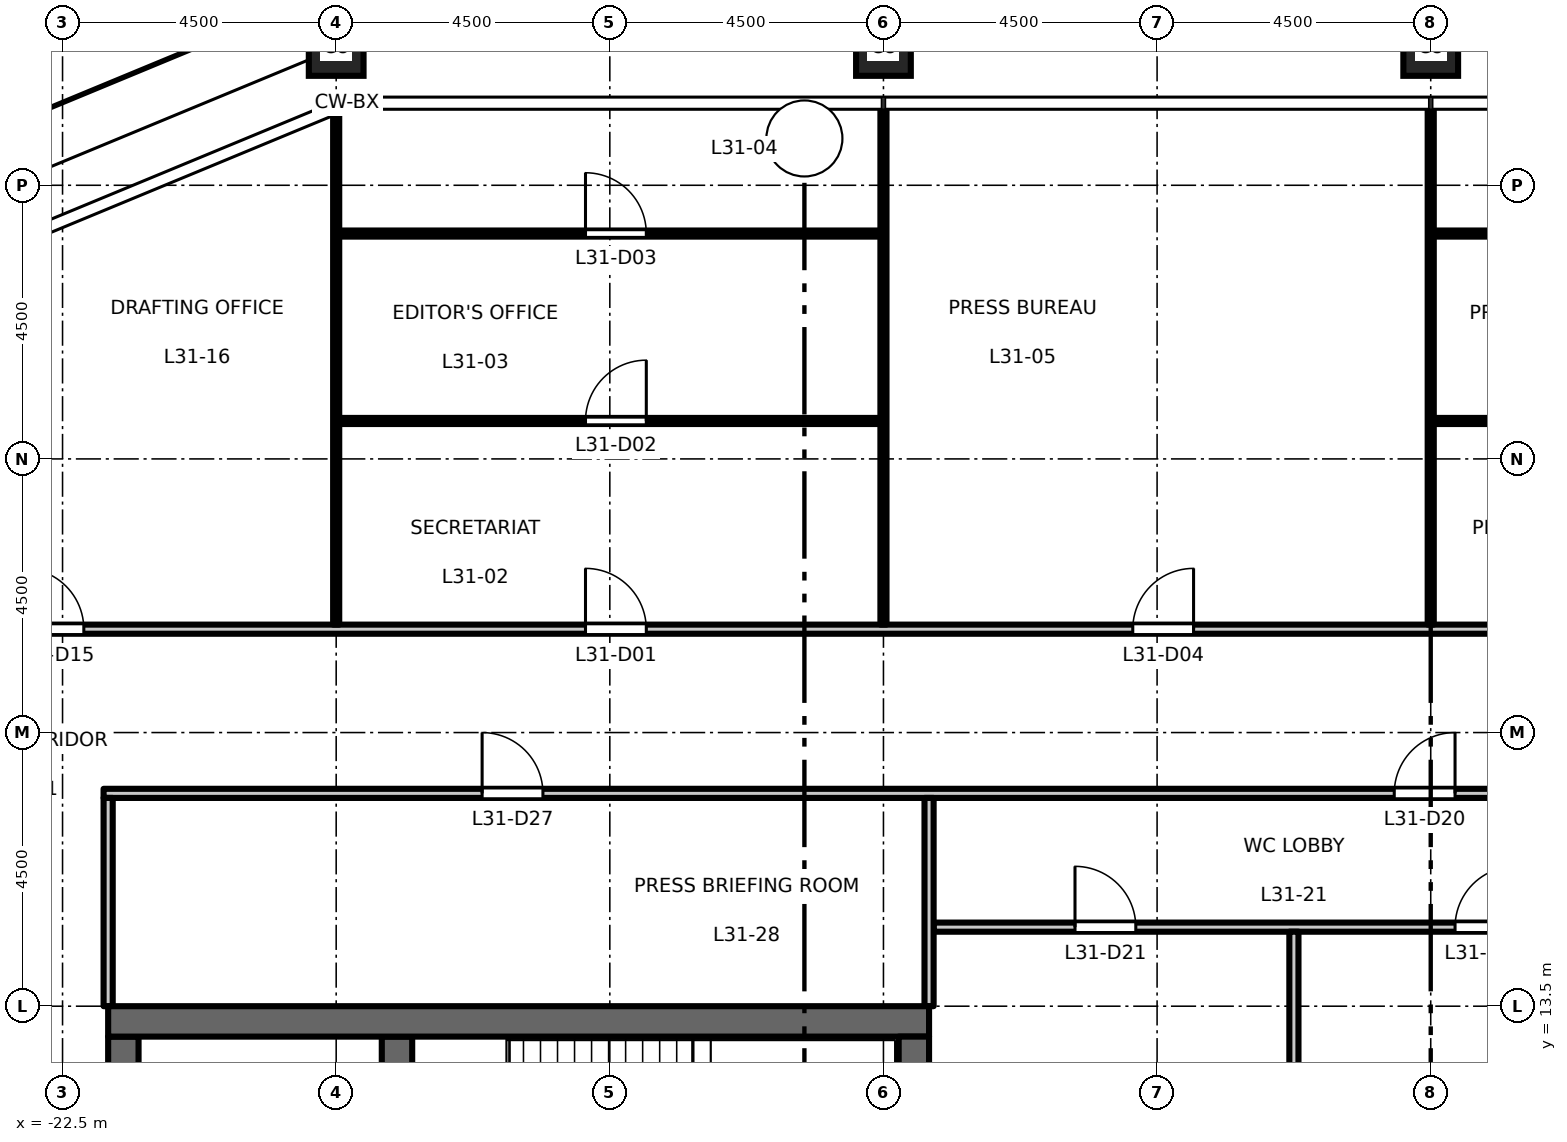
"""IFC4 building model, lengths in metres.
Left out: names, types, materials, properties, quantities, classifications, styles, units other than length and angle.
Written with IfcOpenShell. Run it as: python <this file> out.ifc"""

import sys

from ifc_helpers import new_model, si_unit, direction, frame, frame_2d, origin, origin_2d, place, context, subcontext, project, spatial, rectangle, hollow_rectangle, extrude, element, fill, save


model = new_model("IFC4")
c1 = context("Model", 3, precision=1e-05, world=origin(), true_north=direction((0.0, 1.0)))
c2 = subcontext(c1, "Body", "Model", "MODEL_VIEW")
j1 = project(units=[si_unit("LENGTHUNIT", "METRE"), si_unit("PLANEANGLEUNIT", "RADIAN")], contexts=[c1])
p1 = place(None, origin())
s1 = spatial("IfcSite", under=j1, at=p1, CompositionType="ELEMENT")
p2 = place(p1, origin())
s2 = spatial("IfcBuilding", under=s1, at=p2, CompositionType="ELEMENT")
p3 = place(p2, frame((0.0, 0.0, 145.2)))
s3 = spatial("IfcBuildingStorey", under=s2, at=p3, CompositionType="ELEMENT", Elevation=145.2)
for number, where, z_axis, x_axis in (
    (1, (0.0, 29.25, 0.0), (0.0, 0.0, 1.0), (1.0, 0.0, 0.0)),
    (2, (-9.0, 29.25, 0.0), (0.0, 0.0, 1.0), (1.0, 0.0, 0.0)),
    (3, (-18.0, 29.25, 0.0), (0.0, 0.0, 1.0), (1.0, 0.0, 0.0)),
):
    element("IfcColumn", number, at=place(p3, frame(where, z_axis=z_axis, x_axis=x_axis)), inside=s3, PredefinedType="COLUMN", context=c2, shape_type="SweptSolid", body=[
        extrude(hollow_rectangle(XDim=0.9, YDim=0.9, WallThickness=0.05, at=origin_2d()), origin(), (0.0, 0.0, 1.0), 4.5),
    ])
p4 = place(p3, frame((-21.5, -13.0, 0.0), z_axis=(0.0, 0.0, 1.0), x_axis=(0.0, 1.0, 0.0)))
e4 = element("IfcWall", 4, at=p4, inside=s3, PredefinedType="SHEAR", context=c2, shape_type="SweptSolid", body=[
    extrude(rectangle(XDim=26.0, YDim=0.5, at=frame_2d((13.0, 0.0))), origin(), (0.0, 0.0, 1.0), 4.35),
])
p5 = place(p4, frame((16.825, 0.0, 0.0)))
e5 = element("IfcOpeningElement", 5, at=p5, cuts=e4, PredefinedType="OPENING", context=c2, shape_type="SweptSolid", body=[
    extrude(rectangle(XDim=1.8, YDim=2.1, at=frame_2d((0.9, 1.05))), frame((0.0, 0.26, 0.0), z_axis=(0.0, -1.0, 0.0), x_axis=(1.0, 0.0, 0.0)), (0.0, 0.0, 1.0), 0.52),
])
p6 = place(p4, frame((7.375, 0.0, 0.0)))
e6 = element("IfcOpeningElement", 6, at=p6, cuts=e4, PredefinedType="OPENING", context=c2, shape_type="SweptSolid", body=[
    extrude(rectangle(XDim=1.8, YDim=2.1, at=frame_2d((0.9, 1.05))), frame((0.0, 0.26, 0.0), z_axis=(0.0, -1.0, 0.0), x_axis=(1.0, 0.0, 0.0)), (0.0, 0.0, 1.0), 0.52),
])
p7 = place(p4, frame((23.4, 0.0, 0.0)))
e7 = element("IfcOpeningElement", 7, at=p7, cuts=e4, PredefinedType="OPENING", context=c2, shape_type="SweptSolid", body=[
    extrude(rectangle(XDim=0.9, YDim=2.1, at=frame_2d((0.45, 1.05))), frame((0.0, 0.26, 0.0), z_axis=(0.0, -1.0, 0.0), x_axis=(1.0, 0.0, 0.0)), (0.0, 0.0, 1.0), 0.52),
])
p8 = place(p3, frame((-17.0, 6.425, 0.0), z_axis=(0.0, 0.0, 1.0), x_axis=(0.0, 1.0, 0.0)))
e8 = element("IfcWall", 8, at=p8, inside=s3, PredefinedType="SHEAR", context=c2, shape_type="SweptSolid", body=[
    extrude(rectangle(XDim=6.575, YDim=0.5, at=frame_2d((3.288, 0.0))), origin(), (0.0, 0.0, 1.0), 4.35),
])
p9 = place(p3, frame((-8.25, 13.25, 0.0), z_axis=(0.0, 0.0, 1.0), x_axis=(-1.0, 0.0, 0.0)))
e9 = element("IfcWall", 9, at=p9, inside=s3, PredefinedType="SHEAR", context=c2, shape_type="SweptSolid", body=[
    extrude(rectangle(XDim=13.5, YDim=0.5, at=frame_2d((6.75, 0.0))), origin(), (0.0, 0.0, 1.0), 4.35),
])
p10 = place(p3, frame((-8.5, -13.0, 0.0), z_axis=(0.0, 0.0, 1.0), x_axis=(0.0, 1.0, 0.0)))
e10 = element("IfcWall", 10, at=p10, inside=s3, PredefinedType="SHEAR", context=c2, shape_type="SweptSolid", body=[
    extrude(rectangle(XDim=26.0, YDim=0.5, at=frame_2d((13.0, 0.0))), origin(), (0.0, 0.0, 1.0), 4.35),
])
p11 = place(p3, frame((-8.175, 14.8, 0.0), z_axis=(0.0, 0.0, 1.0), x_axis=(1.0, 0.0, 0.0)))
e11 = element("IfcWall", 11, at=p11, inside=s3, PredefinedType="PARTITIONING", context=c2, shape_type="SweptSolid", body=[
    extrude(rectangle(XDim=14.955, YDim=0.15, at=frame_2d((7.478, 0.0))), origin(), (0.0, 0.0, 1.0), 4.35),
])
p12 = place(p11, frame((2.325, 0.0, 0.0)))
e12 = element("IfcOpeningElement", 12, at=p12, cuts=e11, PredefinedType="OPENING", context=c2, shape_type="SweptSolid", body=[
    extrude(rectangle(XDim=1.0, YDim=2.1, at=frame_2d((0.5, 1.05))), frame((0.0, 0.085, 0.0), z_axis=(0.0, -1.0, 0.0), x_axis=(1.0, 0.0, 0.0)), (0.0, 0.0, 1.0), 0.17),
])
p13 = place(p11, frame((8.575, 0.0, 0.0)))
e13 = element("IfcOpeningElement", 13, at=p13, cuts=e11, PredefinedType="OPENING", context=c2, shape_type="SweptSolid", body=[
    extrude(rectangle(XDim=1.0, YDim=2.1, at=frame_2d((0.5, 1.05))), frame((0.0, 0.085, 0.0), z_axis=(0.0, -1.0, 0.0), x_axis=(1.0, 0.0, 0.0)), (0.0, 0.0, 1.0), 0.17),
])
p14 = place(p11, frame((12.825, 0.0, 0.0)))
e14 = element("IfcOpeningElement", 14, at=p14, cuts=e11, PredefinedType="OPENING", context=c2, shape_type="SweptSolid", body=[
    extrude(rectangle(XDim=1.0, YDim=2.1, at=frame_2d((0.5, 1.05))), frame((0.0, 0.085, 0.0), z_axis=(0.0, -1.0, 0.0), x_axis=(1.0, 0.0, 0.0)), (0.0, 0.0, 1.0), 0.17),
])
p15 = place(p3, frame((-21.825, 17.0, 0.0), z_axis=(0.0, 0.0, 1.0), x_axis=(1.0, 0.0, 0.0)))
e15 = element("IfcWall", 15, at=p15, inside=s3, PredefinedType="PARTITIONING", context=c2, shape_type="SweptSolid", body=[
    extrude(rectangle(XDim=43.65, YDim=0.15, at=frame_2d((21.825, 0.0))), origin(), (0.0, 0.0, 1.0), 4.35),
])
p16 = place(p15, frame((21.225, 0.0, 0.0)))
e16 = element("IfcOpeningElement", 16, at=p16, cuts=e15, PredefinedType="OPENING", context=c2, shape_type="SweptSolid", body=[
    extrude(rectangle(XDim=1.0, YDim=2.1, at=frame_2d((0.5, 1.05))), frame((0.0, 0.085, 0.0), z_axis=(0.0, -1.0, 0.0), x_axis=(1.0, 0.0, 0.0)), (0.0, 0.0, 1.0), 0.17),
])
p17 = place(p15, frame((6.225, 0.0, 0.0)))
e17 = element("IfcOpeningElement", 17, at=p17, cuts=e15, PredefinedType="OPENING", context=c2, shape_type="SweptSolid", body=[
    extrude(rectangle(XDim=1.0, YDim=2.1, at=frame_2d((0.5, 1.05))), frame((0.0, 0.085, 0.0), z_axis=(0.0, -1.0, 0.0), x_axis=(1.0, 0.0, 0.0)), (0.0, 0.0, 1.0), 0.17),
])
p18 = place(p15, frame((36.225, 0.0, 0.0)))
e18 = element("IfcOpeningElement", 18, at=p18, cuts=e15, PredefinedType="OPENING", context=c2, shape_type="SweptSolid", body=[
    extrude(rectangle(XDim=1.0, YDim=2.1, at=frame_2d((0.5, 1.05))), frame((0.0, 0.085, 0.0), z_axis=(0.0, -1.0, 0.0), x_axis=(1.0, 0.0, 0.0)), (0.0, 0.0, 1.0), 0.17),
])
p19 = place(p3, frame((-27.474, 19.7, 0.0), z_axis=(0.0, 0.0, 1.0), x_axis=(1.0, 0.0, 0.0)))
e19 = element("IfcWall", 19, at=p19, inside=s3, PredefinedType="PARTITIONING", context=c2, shape_type="SweptSolid", body=[
    extrude(rectangle(XDim=54.948, YDim=0.15, at=frame_2d((27.474, 0.0))), origin(), (0.0, 0.0, 1.0), 4.35),
])
p20 = place(p19, frame((13.574, 0.0, 0.0)))
e20 = element("IfcOpeningElement", 20, at=p20, cuts=e19, PredefinedType="OPENING", context=c2, shape_type="SweptSolid", body=[
    extrude(rectangle(XDim=1.0, YDim=2.1, at=frame_2d((0.5, 1.05))), frame((0.0, 0.085, 0.0), z_axis=(0.0, -1.0, 0.0), x_axis=(1.0, 0.0, 0.0)), (0.0, 0.0, 1.0), 0.17),
])
p21 = place(p19, frame((22.574, 0.0, 0.0)))
e21 = element("IfcOpeningElement", 21, at=p21, cuts=e19, PredefinedType="OPENING", context=c2, shape_type="SweptSolid", body=[
    extrude(rectangle(XDim=1.0, YDim=2.1, at=frame_2d((0.5, 1.05))), frame((0.0, 0.085, 0.0), z_axis=(0.0, -1.0, 0.0), x_axis=(1.0, 0.0, 0.0)), (0.0, 0.0, 1.0), 0.17),
])
p22 = place(p19, frame((31.574, 0.0, 0.0)))
e22 = element("IfcOpeningElement", 22, at=p22, cuts=e19, PredefinedType="OPENING", context=c2, shape_type="SweptSolid", body=[
    extrude(rectangle(XDim=1.0, YDim=2.1, at=frame_2d((0.5, 1.05))), frame((0.0, 0.085, 0.0), z_axis=(0.0, -1.0, 0.0), x_axis=(1.0, 0.0, 0.0)), (0.0, 0.0, 1.0), 0.17),
])
p23 = place(p19, frame((40.574, 0.0, 0.0)))
e23 = element("IfcOpeningElement", 23, at=p23, cuts=e19, PredefinedType="OPENING", context=c2, shape_type="SweptSolid", body=[
    extrude(rectangle(XDim=1.0, YDim=2.1, at=frame_2d((0.5, 1.05))), frame((0.0, 0.085, 0.0), z_axis=(0.0, -1.0, 0.0), x_axis=(1.0, 0.0, 0.0)), (0.0, 0.0, 1.0), 0.17),
])
p24 = place(p19, frame((4.324, 0.0, 0.0)))
e24 = element("IfcOpeningElement", 24, at=p24, cuts=e19, PredefinedType="OPENING", context=c2, shape_type="SweptSolid", body=[
    extrude(rectangle(XDim=1.0, YDim=2.1, at=frame_2d((0.5, 1.05))), frame((0.0, 0.085, 0.0), z_axis=(0.0, -1.0, 0.0), x_axis=(1.0, 0.0, 0.0)), (0.0, 0.0, 1.0), 0.17),
])
p25 = place(p19, frame((49.798, 0.0, 0.0)))
e25 = element("IfcOpeningElement", 25, at=p25, cuts=e19, PredefinedType="OPENING", context=c2, shape_type="SweptSolid", body=[
    extrude(rectangle(XDim=1.0, YDim=2.1, at=frame_2d((0.5, 1.05))), frame((0.0, 0.085, 0.0), z_axis=(0.0, -1.0, 0.0), x_axis=(1.0, 0.0, 0.0)), (0.0, 0.0, 1.0), 0.17),
])
p26 = place(p3, frame((-17.95, 23.124, 0.0), z_axis=(0.0, 0.0, 1.0), x_axis=(1.0, 0.0, 0.0)))
e26 = element("IfcWall", 26, at=p26, inside=s3, PredefinedType="PARTITIONING", context=c2, shape_type="SweptSolid", body=[
    extrude(rectangle(XDim=8.9, YDim=0.1, at=frame_2d((4.45, 0.0))), origin(), (0.0, 0.0, 1.0), 4.35),
])
p27 = place(p26, frame((4.05, 0.0, 0.0)))
e27 = element("IfcOpeningElement", 27, at=p27, cuts=e26, PredefinedType="OPENING", context=c2, shape_type="SweptSolid", body=[
    extrude(rectangle(XDim=1.0, YDim=2.1, at=frame_2d((0.5, 1.05))), frame((0.0, 0.06, 0.0), z_axis=(0.0, -1.0, 0.0), x_axis=(1.0, 0.0, 0.0)), (0.0, 0.0, 1.0), 0.12),
])
p28 = place(p3, frame((0.05, 23.124, 0.0), z_axis=(0.0, 0.0, 1.0), x_axis=(1.0, 0.0, 0.0)))
e28 = element("IfcWall", 28, at=p28, inside=s3, PredefinedType="PARTITIONING", context=c2, shape_type="SweptSolid", body=[
    extrude(rectangle(XDim=8.9, YDim=0.1, at=frame_2d((4.45, 0.0))), origin(), (0.0, 0.0, 1.0), 4.35),
])
p29 = place(p28, frame((4.05, 0.0, 0.0)))
e29 = element("IfcOpeningElement", 29, at=p29, cuts=e28, PredefinedType="OPENING", context=c2, shape_type="SweptSolid", body=[
    extrude(rectangle(XDim=1.0, YDim=2.1, at=frame_2d((0.5, 1.05))), frame((0.0, 0.06, 0.0), z_axis=(0.0, -1.0, 0.0), x_axis=(1.0, 0.0, 0.0)), (0.0, 0.0, 1.0), 0.12),
])
p30 = place(p3, frame((-17.95, 26.206, 0.0), z_axis=(0.0, 0.0, 1.0), x_axis=(1.0, 0.0, 0.0)))
e30 = element("IfcWall", 30, at=p30, inside=s3, PredefinedType="PARTITIONING", context=c2, shape_type="SweptSolid", body=[
    extrude(rectangle(XDim=8.9, YDim=0.1, at=frame_2d((4.45, 0.0))), origin(), (0.0, 0.0, 1.0), 4.35),
])
p31 = place(p30, frame((4.05, 0.0, 0.0)))
e31 = element("IfcOpeningElement", 31, at=p31, cuts=e30, PredefinedType="OPENING", context=c2, shape_type="SweptSolid", body=[
    extrude(rectangle(XDim=1.0, YDim=2.1, at=frame_2d((0.5, 1.05))), frame((0.0, 0.06, 0.0), z_axis=(0.0, -1.0, 0.0), x_axis=(1.0, 0.0, 0.0)), (0.0, 0.0, 1.0), 0.12),
])
p32 = place(p3, frame((0.05, 26.206, 0.0), z_axis=(0.0, 0.0, 1.0), x_axis=(1.0, 0.0, 0.0)))
e32 = element("IfcWall", 32, at=p32, inside=s3, PredefinedType="PARTITIONING", context=c2, shape_type="SweptSolid", body=[
    extrude(rectangle(XDim=8.9, YDim=0.1, at=frame_2d((4.45, 0.0))), origin(), (0.0, 0.0, 1.0), 4.35),
])
p33 = place(p32, frame((4.05, 0.0, 0.0)))
e33 = element("IfcOpeningElement", 33, at=p33, cuts=e32, PredefinedType="OPENING", context=c2, shape_type="SweptSolid", body=[
    extrude(rectangle(XDim=1.0, YDim=2.1, at=frame_2d((0.5, 1.05))), frame((0.0, 0.06, 0.0), z_axis=(0.0, -1.0, 0.0), x_axis=(1.0, 0.0, 0.0)), (0.0, 0.0, 1.0), 0.12),
])
p34 = place(p3, frame((-21.75, 13.5, 0.0), z_axis=(0.0, 0.0, 1.0), x_axis=(0.0, 1.0, 0.0)))
e34 = element("IfcWall", 34, at=p34, inside=s3, PredefinedType="PARTITIONING", context=c2, shape_type="SweptSolid", body=[
    extrude(rectangle(XDim=3.425, YDim=0.15, at=frame_2d((1.712, 0.0))), origin(), (0.0, 0.0, 1.0), 4.35),
])
p35 = place(p3, frame((-18.0, 19.775, 0.0), z_axis=(0.0, 0.0, 1.0), x_axis=(0.0, 1.0, 0.0)))
e35 = element("IfcWall", 35, at=p35, inside=s3, PredefinedType="PARTITIONING", context=c2, shape_type="SweptSolid", body=[
    extrude(rectangle(XDim=8.403, YDim=0.1, at=frame_2d((4.202, 0.0))), origin(), (0.0, 0.0, 1.0), 3.45),
])
p36 = place(p3, frame((-9.0, 19.775, 0.0), z_axis=(0.0, 0.0, 1.0), x_axis=(0.0, 1.0, 0.0)))
e36 = element("IfcWall", 36, at=p36, inside=s3, PredefinedType="PARTITIONING", context=c2, shape_type="SweptSolid", body=[
    extrude(rectangle(XDim=8.485, YDim=0.1, at=frame_2d((4.243, 0.0))), origin(), (0.0, 0.0, 1.0), 3.45),
])
p37 = place(p3, frame((-8.25, 13.5, 0.0), z_axis=(0.0, 0.0, 1.0), x_axis=(0.0, 1.0, 0.0)))
e37 = element("IfcWall", 37, at=p37, inside=s3, PredefinedType="PARTITIONING", context=c2, shape_type="SweptSolid", body=[
    extrude(rectangle(XDim=3.425, YDim=0.15, at=frame_2d((1.712, 0.0))), origin(), (0.0, 0.0, 1.0), 4.35),
])
p38 = place(p3, frame((-2.25, 8.37, 0.0), z_axis=(0.0, 0.0, 1.0), x_axis=(0.0, 1.0, 0.0)))
e38 = element("IfcWall", 38, at=p38, inside=s3, PredefinedType="PARTITIONING", context=c2, shape_type="SweptSolid", body=[
    extrude(rectangle(XDim=6.355, YDim=0.15, at=frame_2d((3.177, 0.0))), origin(), (0.0, 0.0, 1.0), 4.35),
])
p39 = place(p3, frame((0.0, 19.775, 0.0), z_axis=(0.0, 0.0, 1.0), x_axis=(0.0, 1.0, 0.0)))
e39 = element("IfcWall", 39, at=p39, inside=s3, PredefinedType="PARTITIONING", context=c2, shape_type="SweptSolid", body=[
    extrude(rectangle(XDim=8.485, YDim=0.1, at=frame_2d((4.243, 0.0))), origin(), (0.0, 0.0, 1.0), 3.45),
])
p40 = place(p20, origin())
e40 = element("IfcDoor", 40, at=p40, inside=s3, OperationType="SINGLE_SWING_LEFT", PredefinedType="DOOR", context=c2, shape_type="SweptSolid", body=[
    extrude(rectangle(XDim=1.0, YDim=2.1, at=frame_2d((0.5, 1.05))), frame((0.0, 0.025, 0.0), z_axis=(0.0, -1.0, 0.0), x_axis=(1.0, 0.0, 0.0)), (0.0, 0.0, 1.0), 0.05),
])
fill(e20, e40)
p41 = place(p27, origin())
e41 = element("IfcDoor", 41, at=p41, inside=s3, OperationType="SINGLE_SWING_RIGHT", PredefinedType="DOOR", context=c2, shape_type="SweptSolid", body=[
    extrude(rectangle(XDim=1.0, YDim=2.1, at=frame_2d((0.5, 1.05))), frame((0.0, 0.025, 0.0), z_axis=(0.0, -1.0, 0.0), x_axis=(1.0, 0.0, 0.0)), (0.0, 0.0, 1.0), 0.05),
])
fill(e27, e41)
p42 = place(p31, origin())
e42 = element("IfcDoor", 42, at=p42, inside=s3, OperationType="SINGLE_SWING_LEFT", PredefinedType="DOOR", context=c2, shape_type="SweptSolid", body=[
    extrude(rectangle(XDim=1.0, YDim=2.1, at=frame_2d((0.5, 1.05))), frame((0.0, 0.025, 0.0), z_axis=(0.0, -1.0, 0.0), x_axis=(1.0, 0.0, 0.0)), (0.0, 0.0, 1.0), 0.05),
])
fill(e31, e42)
p43 = place(p21, origin())
e43 = element("IfcDoor", 43, at=p43, inside=s3, OperationType="SINGLE_SWING_RIGHT", PredefinedType="DOOR", context=c2, shape_type="SweptSolid", body=[
    extrude(rectangle(XDim=1.0, YDim=2.1, at=frame_2d((0.5, 1.05))), frame((0.0, 0.025, 0.0), z_axis=(0.0, -1.0, 0.0), x_axis=(1.0, 0.0, 0.0)), (0.0, 0.0, 1.0), 0.05),
])
fill(e21, e43)
p44 = place(p24, origin())
e44 = element("IfcDoor", 44, at=p44, inside=s3, OperationType="SINGLE_SWING_LEFT", PredefinedType="DOOR", context=c2, shape_type="SweptSolid", body=[
    extrude(rectangle(XDim=1.0, YDim=2.1, at=frame_2d((0.5, 1.05))), frame((0.0, 0.025, 0.0), z_axis=(0.0, -1.0, 0.0), x_axis=(1.0, 0.0, 0.0)), (0.0, 0.0, 1.0), 0.05),
])
fill(e24, e44)
p45 = place(p16, origin())
e45 = element("IfcDoor", 45, at=p45, inside=s3, OperationType="SINGLE_SWING_RIGHT", PredefinedType="DOOR", context=c2, shape_type="SweptSolid", body=[
    extrude(rectangle(XDim=1.0, YDim=2.1, at=frame_2d((0.5, 1.05))), frame((0.0, 0.025, 0.0), z_axis=(0.0, -1.0, 0.0), x_axis=(1.0, 0.0, 0.0)), (0.0, 0.0, 1.0), 0.05),
])
fill(e16, e45)
p46 = place(p12, origin())
e46 = element("IfcDoor", 46, at=p46, inside=s3, OperationType="SINGLE_SWING_LEFT", PredefinedType="DOOR", context=c2, shape_type="SweptSolid", body=[
    extrude(rectangle(XDim=1.0, YDim=2.1, at=frame_2d((0.5, 1.05))), frame((0.0, 0.025, 0.0), z_axis=(0.0, -1.0, 0.0), x_axis=(1.0, 0.0, 0.0)), (0.0, 0.0, 1.0), 0.05),
])
fill(e12, e46)
p47 = place(p13, origin())
e47 = element("IfcDoor", 47, at=p47, inside=s3, OperationType="SINGLE_SWING_RIGHT", PredefinedType="DOOR", context=c2, shape_type="SweptSolid", body=[
    extrude(rectangle(XDim=1.0, YDim=2.1, at=frame_2d((0.5, 1.05))), frame((0.0, 0.025, 0.0), z_axis=(0.0, -1.0, 0.0), x_axis=(1.0, 0.0, 0.0)), (0.0, 0.0, 1.0), 0.05),
])
fill(e13, e47)
p48 = place(p17, origin())
e48 = element("IfcDoor", 48, at=p48, inside=s3, OperationType="SINGLE_SWING_LEFT", PredefinedType="DOOR", context=c2, shape_type="SweptSolid", body=[
    extrude(rectangle(XDim=1.0, YDim=2.1, at=frame_2d((0.5, 1.05))), frame((0.0, 0.025, 0.0), z_axis=(0.0, -1.0, 0.0), x_axis=(1.0, 0.0, 0.0)), (0.0, 0.0, 1.0), 0.05),
])
fill(e17, e48)
save(model, sys.argv[1])
